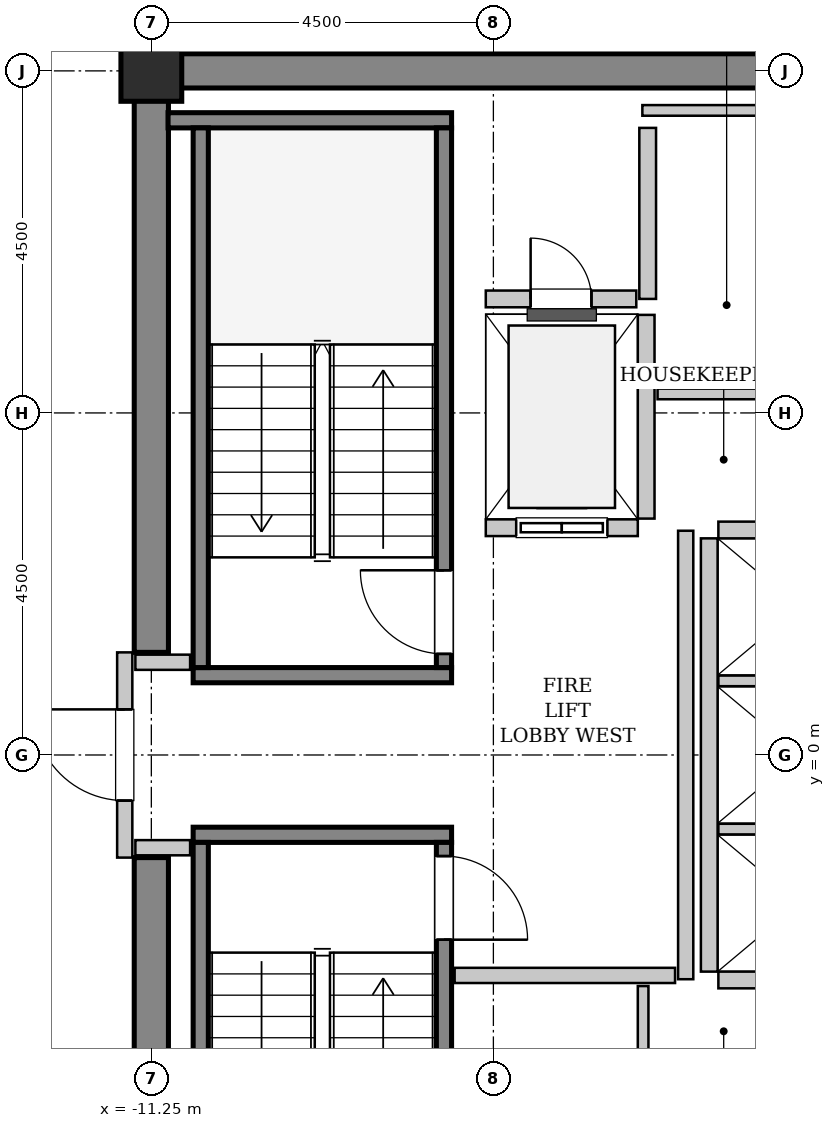
"""IFC4 building model, lengths in metres.
Left out: names, types, materials, properties, quantities, classifications, styles, units other than length and angle.
Written with IfcOpenShell. Run it as: python <this file> out.ifc"""

import sys

from ifc_helpers import new_model, si_unit, direction, frame, frame_2d, origin, origin_2d, place, context, subcontext, project, spatial, rectangle, hollow_rectangle, extrude, source, transform, mapped, element, fill, save


model = new_model("IFC4")
c1 = context("Model", 3, precision=1e-05, world=origin(), true_north=direction((0.0, 1.0)))
c2 = subcontext(c1, "Body", "Model", "MODEL_VIEW")
j1 = project(units=[si_unit("LENGTHUNIT", "METRE"), si_unit("PLANEANGLEUNIT", "RADIAN")], contexts=[c1])
p1 = place(None, origin())
s1 = spatial("IfcSite", under=j1, at=p1, CompositionType="ELEMENT")
p2 = place(p1, origin())
s2 = spatial("IfcBuilding", under=s1, at=p2, CompositionType="ELEMENT")
p3 = place(p2, frame((0.0, 0.0, 233.2)))
s3 = spatial("IfcBuildingStorey", under=s2, at=p3, CompositionType="ELEMENT", Elevation=233.2)
m1 = source(origin(), c2, "Body", "SweptSolid", [
    extrude(rectangle(XDim=9.925, YDim=0.45, at=frame_2d((4.962, 0.0))), origin(), (0.0, 0.0, 1.0), 3.8),
])
p4 = place(p3, frame((-11.475, 9.0, 0.0), z_axis=(0.0, 0.0, 1.0), x_axis=(1.0, 0.0, 0.0)))
e1 = element("IfcWall", 1, at=p4, inside=s3, PredefinedType="SHEAR", context=c2, shape_type="MappedRepresentation", body=[
    mapped(m1, transform((0.0, 0.0, 0.0), x_axis=(1.0, 0.0, 0.0), y_axis=(0.0, 1.0, 0.0), z_axis=(0.0, 0.0, 1.0), scale=1.0)),
])
m2 = source(origin(), c2, "Body", "SweptSolid", [
    extrude(rectangle(XDim=7.425, YDim=0.45, at=frame_2d((3.712, 0.0))), origin(), (0.0, 0.0, 1.0), 3.8),
])
for number, where, z_axis, x_axis in (
    (2, (-11.25, -8.775, 0.0), (0.0, 0.0, 1.0), (0.0, 1.0, 0.0)),
    (3, (-11.25, 1.35, 0.0), (0.0, 0.0, 1.0), (0.0, 1.0, 0.0)),
):
    element("IfcWall", number, at=place(p3, frame(where, z_axis=z_axis, x_axis=x_axis)), inside=s3, PredefinedType="SHEAR", context=c2, shape_type="MappedRepresentation", body=[
        mapped(m2, transform((0.0, 0.0, 0.0), x_axis=(1.0, 0.0, 0.0), y_axis=(0.0, 1.0, 0.0), z_axis=(0.0, 0.0, 1.0), scale=1.0)),
    ])
m3 = source(origin(), c2, "Body", "SweptSolid", [
    extrude(hollow_rectangle(XDim=0.8, YDim=0.8, WallThickness=0.04, InnerFilletRadius=0.04, OuterFilletRadius=0.08, at=origin_2d()), origin(), (0.0, 0.0, 1.0), 3.8),
])
p5 = place(p3, frame((-11.25, 9.0, 0.0), z_axis=(0.0, 0.0, 1.0), x_axis=(1.0, 0.0, 0.0)))
e4 = element("IfcColumn", 4, at=p5, inside=s3, PredefinedType="COLUMN", context=c2, shape_type="MappedRepresentation", body=[
    mapped(m3, transform((0.0, 0.0, 0.0), x_axis=(1.0, 0.0, 0.0), y_axis=(0.0, 1.0, 0.0), z_axis=(0.0, 0.0, 1.0), scale=1.0)),
])
m4 = source(origin(), c2, "Body", "SweptSolid", [
    extrude(rectangle(XDim=3.4, YDim=0.2, at=frame_2d((1.7, 0.0))), origin(), (0.0, 0.0, 1.0), 3.8),
])
p6 = place(p3, frame((-7.3, 1.05, 0.0), z_axis=(0.0, 0.0, 1.0), x_axis=(-1.0, 0.0, 0.0)))
e5 = element("IfcWall", 5, at=p6, inside=s3, PredefinedType="SOLIDWALL", context=c2, shape_type="MappedRepresentation", body=[
    mapped(m4, transform((0.0, 0.0, 0.0), x_axis=(1.0, 0.0, 0.0), y_axis=(0.0, 1.0, 0.0), z_axis=(0.0, 0.0, 1.0), scale=1.0)),
])
m5 = source(origin(), c2, "Body", "SweptSolid", [
    extrude(rectangle(XDim=3.73, YDim=0.2, at=frame_2d((1.865, 0.0))), origin(), (0.0, 0.0, 1.0), 3.8),
])
p7 = place(p3, frame((-7.3, 8.35, 0.0), z_axis=(0.0, 0.0, 1.0), x_axis=(-1.0, 0.0, 0.0)))
e6 = element("IfcWall", 6, at=p7, inside=s3, PredefinedType="SOLIDWALL", context=c2, shape_type="MappedRepresentation", body=[
    mapped(m5, transform((0.0, 0.0, 0.0), x_axis=(1.0, 0.0, 0.0), y_axis=(0.0, 1.0, 0.0), z_axis=(0.0, 0.0, 1.0), scale=1.0)),
])
m6 = source(origin(), c2, "Body", "SweptSolid", [
    extrude(rectangle(XDim=7.1, YDim=0.2, at=frame_2d((3.55, 0.0))), origin(), (0.0, 0.0, 1.0), 3.8),
])
p8 = place(p3, frame((-7.4, 1.15, 0.0), z_axis=(0.0, 0.0, 1.0), x_axis=(0.0, 1.0, 0.0)))
e7 = element("IfcWall", 7, at=p8, inside=s3, PredefinedType="SOLIDWALL", context=c2, shape_type="MappedRepresentation", body=[
    mapped(m6, transform((0.0, 0.0, 0.0), x_axis=(1.0, 0.0, 0.0), y_axis=(0.0, 1.0, 0.0), z_axis=(0.0, 0.0, 1.0), scale=1.0)),
])
p9 = place(p8, frame((0.18, 0.0, 0.0)))
e8 = element("IfcOpeningElement", 8, at=p9, cuts=e7, PredefinedType="OPENING", context=c2, shape_type="SweptSolid", body=[
    extrude(rectangle(XDim=1.1, YDim=2.15, at=frame_2d((0.55, 1.075))), frame((0.0, 0.11, 0.0), z_axis=(0.0, -1.0, 0.0), x_axis=(1.0, 0.0, 0.0)), (0.0, 0.0, 1.0), 0.22),
])
p10 = place(p3, frame((-10.6, 1.15, 0.0), z_axis=(0.0, 0.0, 1.0), x_axis=(0.0, 1.0, 0.0)))
e9 = element("IfcWall", 9, at=p10, inside=s3, PredefinedType="SOLIDWALL", context=c2, shape_type="MappedRepresentation", body=[
    mapped(m6, transform((0.0, 0.0, 0.0), x_axis=(1.0, 0.0, 0.0), y_axis=(0.0, 1.0, 0.0), z_axis=(0.0, 0.0, 1.0), scale=1.0)),
])
p11 = place(p3, frame((-10.7, -1.05, 0.0), z_axis=(0.0, 0.0, 1.0), x_axis=(1.0, 0.0, 0.0)))
e10 = element("IfcWall", 10, at=p11, inside=s3, PredefinedType="SOLIDWALL", context=c2, shape_type="MappedRepresentation", body=[
    mapped(m4, transform((0.0, 0.0, 0.0), x_axis=(1.0, 0.0, 0.0), y_axis=(0.0, 1.0, 0.0), z_axis=(0.0, 0.0, 1.0), scale=1.0)),
])
p12 = place(p3, frame((-10.6, -1.15, 0.0), z_axis=(0.0, 0.0, 1.0), x_axis=(0.0, -1.0, 0.0)))
e11 = element("IfcWall", 11, at=p12, inside=s3, PredefinedType="SOLIDWALL", context=c2, shape_type="MappedRepresentation", body=[
    mapped(m6, transform((0.0, 0.0, 0.0), x_axis=(1.0, 0.0, 0.0), y_axis=(0.0, 1.0, 0.0), z_axis=(0.0, 0.0, 1.0), scale=1.0)),
])
p13 = place(p3, frame((-7.4, -1.15, 0.0), z_axis=(0.0, 0.0, 1.0), x_axis=(0.0, -1.0, 0.0)))
e12 = element("IfcWall", 12, at=p13, inside=s3, PredefinedType="SOLIDWALL", context=c2, shape_type="MappedRepresentation", body=[
    mapped(m6, transform((0.0, 0.0, 0.0), x_axis=(1.0, 0.0, 0.0), y_axis=(0.0, 1.0, 0.0), z_axis=(0.0, 0.0, 1.0), scale=1.0)),
])
p14 = place(p13, frame((0.18, 0.0, 0.0)))
e13 = element("IfcOpeningElement", 13, at=p14, cuts=e12, PredefinedType="OPENING", context=c2, shape_type="SweptSolid", body=[
    extrude(rectangle(XDim=1.1, YDim=2.15, at=frame_2d((0.55, 1.075))), frame((0.0, 0.11, 0.0), z_axis=(0.0, -1.0, 0.0), x_axis=(1.0, 0.0, 0.0)), (0.0, 0.0, 1.0), 0.22),
])
m7 = source(origin(), c2, "Body", "SweptSolid", [
    extrude(rectangle(XDim=2.0, YDim=0.22, at=frame_2d((1.0, 0.0))), origin(), (0.0, 0.0, 1.0), 3.535),
])
p15 = place(p3, frame((-6.85, 2.99, 0.0), z_axis=(0.0, 0.0, 1.0), x_axis=(1.0, 0.0, 0.0)))
e14 = element("IfcWall", 14, at=p15, inside=s3, PredefinedType="SOLIDWALL", context=c2, shape_type="MappedRepresentation", body=[
    mapped(m7, transform((0.0, 0.0, 0.0), x_axis=(1.0, 0.0, 0.0), y_axis=(0.0, 1.0, 0.0), z_axis=(0.0, 0.0, 1.0), scale=1.0)),
])
p16 = place(p15, frame((0.4, 0.0, 0.0)))
e15 = element("IfcOpeningElement", 15, at=p16, cuts=e14, PredefinedType="OPENING", context=c2, shape_type="SweptSolid", body=[
    extrude(rectangle(XDim=1.2, YDim=2.2, at=frame_2d((0.6, 1.1))), frame((0.0, 0.12, 0.0), z_axis=(0.0, -1.0, 0.0), x_axis=(1.0, 0.0, 0.0)), (0.0, 0.0, 1.0), 0.24),
])
m8 = source(origin(), c2, "Body", "SweptSolid", [
    extrude(rectangle(XDim=2.68, YDim=0.22, at=frame_2d((1.34, 0.0))), origin(), (0.0, 0.0, 1.0), 3.535),
])
p17 = place(p3, frame((-4.74, 3.11, 0.0), z_axis=(0.0, 0.0, 1.0), x_axis=(0.0, 1.0, 0.0)))
e16 = element("IfcWall", 16, at=p17, inside=s3, PredefinedType="SOLIDWALL", context=c2, shape_type="MappedRepresentation", body=[
    mapped(m8, transform((0.0, 0.0, 0.0), x_axis=(1.0, 0.0, 0.0), y_axis=(0.0, 1.0, 0.0), z_axis=(0.0, 0.0, 1.0), scale=1.0)),
])
m9 = source(origin(), c2, "Body", "SweptSolid", [
    extrude(rectangle(XDim=5.7, YDim=0.22, at=frame_2d((2.85, 0.0))), origin(), (0.0, 0.0, 1.0), 3.535),
])
p18 = place(p3, frame((-3.91, 2.85, 0.0), z_axis=(0.0, 0.0, 1.0), x_axis=(0.0, -1.0, 0.0)))
e17 = element("IfcWall", 17, at=p18, inside=s3, PredefinedType="SOLIDWALL", context=c2, shape_type="MappedRepresentation", body=[
    mapped(m9, transform((0.0, 0.0, 0.0), x_axis=(1.0, 0.0, 0.0), y_axis=(0.0, 1.0, 0.0), z_axis=(0.0, 0.0, 1.0), scale=1.0)),
])
m10 = source(origin(), c2, "Body", "SweptSolid", [
    extrude(rectangle(XDim=2.13, YDim=0.22, at=frame_2d((1.065, 0.0))), origin(), (0.0, 0.0, 1.0), 3.535),
])
p19 = place(p3, frame((-3.79, -2.96, 0.0), z_axis=(0.0, 0.0, 1.0), x_axis=(1.0, 0.0, 0.0)))
e18 = element("IfcWall", 18, at=p19, inside=s3, PredefinedType="SOLIDWALL", context=c2, shape_type="MappedRepresentation", body=[
    mapped(m10, transform((0.0, 0.0, 0.0), x_axis=(1.0, 0.0, 0.0), y_axis=(0.0, 1.0, 0.0), z_axis=(0.0, 0.0, 1.0), scale=1.0)),
])
m11 = source(origin(), c2, "Body", "SweptSolid", [
    extrude(rectangle(XDim=2.13, YDim=0.14, at=frame_2d((1.065, 0.0))), origin(), (0.0, 0.0, 1.0), 3.535),
])
for number, where, z_axis, x_axis in (
    (19, (-3.79, -0.975, 0.0), (0.0, 0.0, 1.0), (1.0, 0.0, 0.0)),
    (20, (-3.79, 0.975, 0.0), (0.0, 0.0, 1.0), (1.0, 0.0, 0.0)),
):
    element("IfcWall", number, at=place(p3, frame(where, z_axis=z_axis, x_axis=x_axis)), inside=s3, PredefinedType="PARTITIONING", context=c2, shape_type="MappedRepresentation", body=[
        mapped(m11, transform((0.0, 0.0, 0.0), x_axis=(1.0, 0.0, 0.0), y_axis=(0.0, 1.0, 0.0), z_axis=(0.0, 0.0, 1.0), scale=1.0)),
    ])
p20 = place(p3, frame((-1.66, 2.96, 0.0), z_axis=(0.0, 0.0, 1.0), x_axis=(-1.0, 0.0, 0.0)))
e21 = element("IfcWall", 21, at=p20, inside=s3, PredefinedType="SOLIDWALL", context=c2, shape_type="MappedRepresentation", body=[
    mapped(m10, transform((0.0, 0.0, 0.0), x_axis=(1.0, 0.0, 0.0), y_axis=(0.0, 1.0, 0.0), z_axis=(0.0, 0.0, 1.0), scale=1.0)),
])
m12 = source(origin(), c2, "Body", "SweptSolid", [
    extrude(rectangle(XDim=2.25, YDim=0.22, at=frame_2d((1.125, 0.0))), origin(), (0.0, 0.0, 1.0), 3.535),
])
p21 = place(p3, frame((-4.72, 6.0, 0.0), z_axis=(0.0, 0.0, 1.0), x_axis=(0.0, 1.0, 0.0)))
e22 = element("IfcWall", 22, at=p21, inside=s3, PredefinedType="SOLIDWALL", context=c2, shape_type="MappedRepresentation", body=[
    mapped(m12, transform((0.0, 0.0, 0.0), x_axis=(1.0, 0.0, 0.0), y_axis=(0.0, 1.0, 0.0), z_axis=(0.0, 0.0, 1.0), scale=1.0)),
])
m13 = source(origin(), c2, "Body", "SweptSolid", [
    extrude(rectangle(XDim=1.98, YDim=0.22, at=frame_2d((0.99, 0.0))), origin(), (0.0, 0.0, 1.0), 3.535),
])
p22 = place(p3, frame((-6.85, 6.0, 0.0), z_axis=(0.0, 0.0, 1.0), x_axis=(1.0, 0.0, 0.0)))
e23 = element("IfcWall", 23, at=p22, inside=s3, PredefinedType="SOLIDWALL", context=c2, shape_type="MappedRepresentation", body=[
    mapped(m13, transform((0.0, 0.0, 0.0), x_axis=(1.0, 0.0, 0.0), y_axis=(0.0, 1.0, 0.0), z_axis=(0.0, 0.0, 1.0), scale=1.0)),
])
p23 = place(p22, frame((0.59, 0.0, 0.0)))
e24 = element("IfcOpeningElement", 24, at=p23, cuts=e23, PredefinedType="OPENING", context=c2, shape_type="SweptSolid", body=[
    extrude(rectangle(XDim=0.8, YDim=2.0, at=frame_2d((0.4, 1.0))), frame((0.0, 0.12, 0.0), z_axis=(0.0, -1.0, 0.0), x_axis=(1.0, 0.0, 0.0)), (0.0, 0.0, 1.0), 0.24),
])
m14 = source(origin(), c2, "Body", "SweptSolid", [
    extrude(rectangle(XDim=2.7, YDim=0.2, at=frame_2d((1.35, 0.0))), origin(), (0.0, 0.0, 1.0), 2.625),
])
p24 = place(p3, frame((-11.6, -1.35, 0.0), z_axis=(0.0, 0.0, 1.0), x_axis=(0.0, 1.0, 0.0)))
e25 = element("IfcWall", 25, at=p24, inside=s3, PredefinedType="PARTITIONING", context=c2, shape_type="MappedRepresentation", body=[
    mapped(m14, transform((0.0, 0.0, 0.0), x_axis=(1.0, 0.0, 0.0), y_axis=(0.0, 1.0, 0.0), z_axis=(0.0, 0.0, 1.0), scale=1.0)),
])
p25 = place(p24, frame((0.75, 0.0, 0.0)))
e26 = element("IfcOpeningElement", 26, at=p25, cuts=e25, PredefinedType="OPENING", context=c2, shape_type="SweptSolid", body=[
    extrude(rectangle(XDim=1.2, YDim=2.15, at=frame_2d((0.6, 1.075))), frame((0.0, 0.11, 0.0), z_axis=(0.0, -1.0, 0.0), x_axis=(1.0, 0.0, 0.0)), (0.0, 0.0, 1.0), 0.22),
])
m15 = source(origin(), c2, "Body", "SweptSolid", [
    extrude(rectangle(XDim=5.9, YDim=0.2, at=frame_2d((2.95, 0.0))), origin(), (0.0, 0.0, 1.0), 3.535),
])
p26 = place(p3, frame((-4.22, -2.95, 0.0), z_axis=(0.0, 0.0, 1.0), x_axis=(0.0, 1.0, 0.0)))
e27 = element("IfcWall", 27, at=p26, inside=s3, PredefinedType="PARTITIONING", context=c2, shape_type="MappedRepresentation", body=[
    mapped(m15, transform((0.0, 0.0, 0.0), x_axis=(1.0, 0.0, 0.0), y_axis=(0.0, 1.0, 0.0), z_axis=(0.0, 0.0, 1.0), scale=1.0)),
])
m16 = source(origin(), c2, "Body", "SweptSolid", [
    extrude(rectangle(XDim=2.9, YDim=0.2, at=frame_2d((1.45, 0.0))), origin(), (0.0, 0.0, 1.0), 3.535),
])
p27 = place(p3, frame((-7.26, -2.9, 0.0), z_axis=(0.0, 0.0, 1.0), x_axis=(1.0, 0.0, 0.0)))
e28 = element("IfcWall", 28, at=p27, inside=s3, PredefinedType="PARTITIONING", context=c2, shape_type="MappedRepresentation", body=[
    mapped(m16, transform((0.0, 0.0, 0.0), x_axis=(1.0, 0.0, 0.0), y_axis=(0.0, 1.0, 0.0), z_axis=(0.0, 0.0, 1.0), scale=1.0)),
])
m17 = source(origin(), c2, "Body", "SweptSolid", [
    extrude(rectangle(XDim=0.72, YDim=0.2, at=frame_2d((0.36, 0.0))), origin(), (0.0, 0.0, 1.0), 3.535),
])
for number, where, z_axis, x_axis in (
    (29, (-11.46, 1.22, 0.0), (0.0, 0.0, 1.0), (1.0, 0.0, 0.0)),
    (30, (-11.46, -1.22, 0.0), (0.0, 0.0, 1.0), (1.0, 0.0, 0.0)),
):
    element("IfcWall", number, at=place(p3, frame(where, z_axis=z_axis, x_axis=x_axis)), inside=s3, PredefinedType="PARTITIONING", context=c2, shape_type="MappedRepresentation", body=[
        mapped(m17, transform((0.0, 0.0, 0.0), x_axis=(1.0, 0.0, 0.0), y_axis=(0.0, 1.0, 0.0), z_axis=(0.0, 0.0, 1.0), scale=1.0)),
    ])
m18 = source(origin(), c2, "Body", "SweptSolid", [
    extrude(rectangle(XDim=2.95, YDim=0.14, at=frame_2d((1.475, 0.0))), origin(), (0.0, 0.0, 1.0), 3.535),
])
p28 = place(p3, frame((-4.59, 4.75, 0.0), z_axis=(0.0, 0.0, 1.0), x_axis=(1.0, 0.0, 0.0)))
e31 = element("IfcWall", 31, at=p28, inside=s3, PredefinedType="PARTITIONING", context=c2, shape_type="MappedRepresentation", body=[
    mapped(m18, transform((0.0, 0.0, 0.0), x_axis=(1.0, 0.0, 0.0), y_axis=(0.0, 1.0, 0.0), z_axis=(0.0, 0.0, 1.0), scale=1.0)),
])
m19 = source(origin(), c2, "Body", "SweptSolid", [
    extrude(rectangle(XDim=3.15, YDim=0.14, at=frame_2d((1.575, 0.0))), origin(), (0.0, 0.0, 1.0), 3.535),
])
p29 = place(p3, frame((-4.79, 8.48, 0.0), z_axis=(0.0, 0.0, 1.0), x_axis=(1.0, 0.0, 0.0)))
e32 = element("IfcWall", 32, at=p29, inside=s3, PredefinedType="PARTITIONING", context=c2, shape_type="MappedRepresentation", body=[
    mapped(m19, transform((0.0, 0.0, 0.0), x_axis=(1.0, 0.0, 0.0), y_axis=(0.0, 1.0, 0.0), z_axis=(0.0, 0.0, 1.0), scale=1.0)),
])
m20 = source(origin(), c2, "Body", "SweptSolid", [
    extrude(rectangle(XDim=1.1, YDim=0.14, at=frame_2d((0.55, 0.0))), origin(), (0.0, 0.0, 1.0), 3.535),
])
p30 = place(p3, frame((-4.78, -4.14, 0.0), z_axis=(0.0, 0.0, 1.0), x_axis=(0.0, 1.0, 0.0)))
e33 = element("IfcWall", 33, at=p30, inside=s3, PredefinedType="PARTITIONING", context=c2, shape_type="MappedRepresentation", body=[
    mapped(m20, transform((0.0, 0.0, 0.0), x_axis=(1.0, 0.0, 0.0), y_axis=(0.0, 1.0, 0.0), z_axis=(0.0, 0.0, 1.0), scale=1.0)),
])
m21 = source(origin(), c2, "Body", "SweptSolid", [
    extrude(rectangle(XDim=1.1, YDim=2.15, at=frame_2d((0.55, 1.075))), frame((0.0, 0.025, 0.0), z_axis=(0.0, -1.0, 0.0), x_axis=(1.0, 0.0, 0.0)), (0.0, 0.0, 1.0), 0.05),
])
p31 = place(p9, origin())
e34 = element("IfcDoor", 34, at=p31, inside=s3, OperationType="SINGLE_SWING_RIGHT", PredefinedType="DOOR", context=c2, shape_type="MappedRepresentation", body=[
    mapped(m21, transform((0.0, 0.0, 0.0), x_axis=(1.0, 0.0, 0.0), y_axis=(0.0, 1.0, 0.0), z_axis=(0.0, 0.0, 1.0), scale=1.0)),
])
fill(e8, e34)
p32 = place(p14, origin())
e35 = element("IfcDoor", 35, at=p32, inside=s3, OperationType="SINGLE_SWING_RIGHT", PredefinedType="DOOR", context=c2, shape_type="MappedRepresentation", body=[
    mapped(m21, transform((0.0, 0.0, 0.0), x_axis=(1.0, 0.0, 0.0), y_axis=(0.0, 1.0, 0.0), z_axis=(0.0, 0.0, 1.0), scale=1.0)),
])
fill(e13, e35)
m22 = source(origin(), c2, "Body", "SweptSolid", [
    extrude(rectangle(XDim=1.2, YDim=2.2, at=frame_2d((0.6, 1.1))), frame((0.0, 0.025, 0.0), z_axis=(0.0, -1.0, 0.0), x_axis=(1.0, 0.0, 0.0)), (0.0, 0.0, 1.0), 0.05),
])
p33 = place(p16, origin())
e36 = element("IfcDoor", 36, at=p33, inside=s3, OperationType="SLIDING_TO_LEFT", PredefinedType="DOOR", context=c2, shape_type="MappedRepresentation", body=[
    mapped(m22, transform((0.0, 0.0, 0.0), x_axis=(1.0, 0.0, 0.0), y_axis=(0.0, 1.0, 0.0), z_axis=(0.0, 0.0, 1.0), scale=1.0)),
])
fill(e15, e36)
m23 = source(origin(), c2, "Body", "SweptSolid", [
    extrude(rectangle(XDim=0.8, YDim=2.0, at=frame_2d((0.4, 1.0))), frame((0.0, 0.025, 0.0), z_axis=(0.0, -1.0, 0.0), x_axis=(1.0, 0.0, 0.0)), (0.0, 0.0, 1.0), 0.05),
])
p34 = place(p23, origin())
e37 = element("IfcDoor", 37, at=p34, inside=s3, OperationType="SINGLE_SWING_LEFT", PredefinedType="TRAPDOOR", context=c2, shape_type="MappedRepresentation", body=[
    mapped(m23, transform((0.0, 0.0, 0.0), x_axis=(1.0, 0.0, 0.0), y_axis=(0.0, 1.0, 0.0), z_axis=(0.0, 0.0, 1.0), scale=1.0)),
])
fill(e24, e37)
m24 = source(origin(), c2, "Body", "SweptSolid", [
    extrude(rectangle(XDim=1.2, YDim=2.15, at=frame_2d((0.6, 1.075))), frame((0.0, 0.025, 0.0), z_axis=(0.0, -1.0, 0.0), x_axis=(1.0, 0.0, 0.0)), (0.0, 0.0, 1.0), 0.05),
])
p35 = place(p25, origin())
e38 = element("IfcDoor", 38, at=p35, inside=s3, OperationType="SINGLE_SWING_RIGHT", PredefinedType="DOOR", context=c2, shape_type="MappedRepresentation", body=[
    mapped(m24, transform((0.0, 0.0, 0.0), x_axis=(1.0, 0.0, 0.0), y_axis=(0.0, 1.0, 0.0), z_axis=(0.0, 0.0, 1.0), scale=1.0)),
])
fill(e26, e38)
save(model, sys.argv[1])
